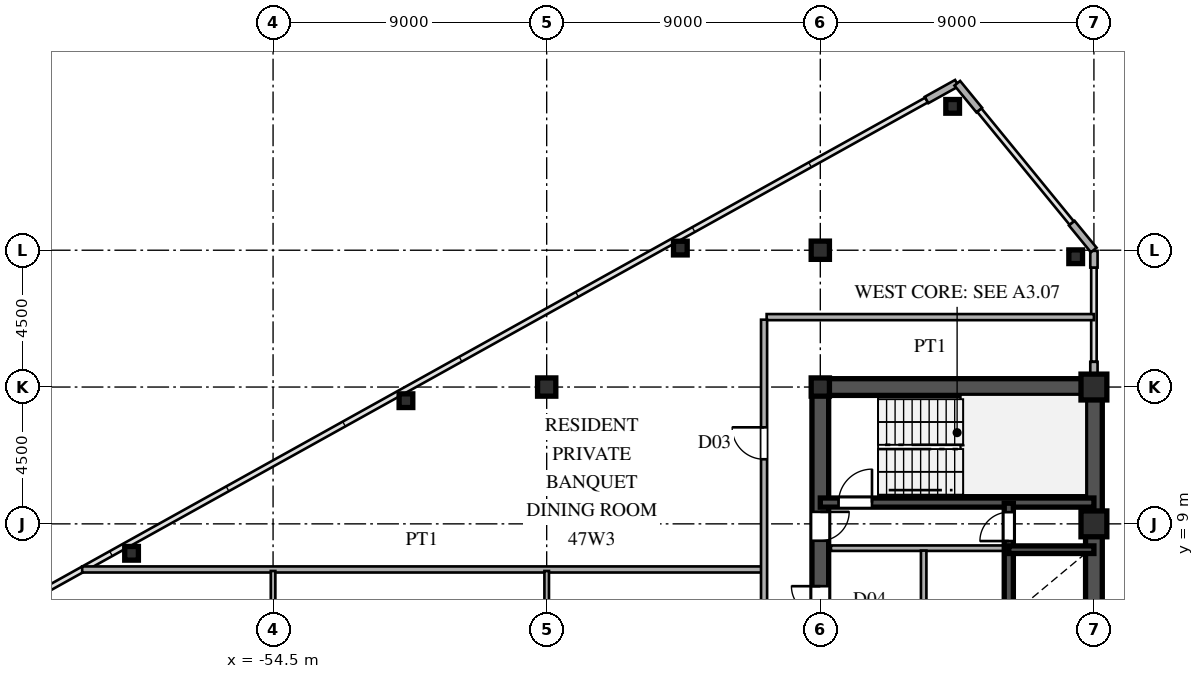
"""IFC4 building model, lengths in metres.
Left out: names, types, materials, properties, quantities, classifications, styles, units other than length and angle.
Written with IfcOpenShell. Run it as: python <this file> out.ifc"""

import sys

from ifc_helpers import new_model, si_unit, direction, frame, frame_2d, origin, origin_2d, place, context, subcontext, project, spatial, rectangle, hollow_rectangle, i_section, extrude, source, transform, mapped, element, fill, save


model = new_model("IFC4")
c1 = context("Model", 3, precision=1e-05, world=origin(), true_north=direction((0.0, 1.0)))
c2 = subcontext(c1, "Body", "Model", "MODEL_VIEW")
j1 = project(units=[si_unit("LENGTHUNIT", "METRE"), si_unit("PLANEANGLEUNIT", "RADIAN")], contexts=[c1])
p1 = place(None, origin())
s1 = spatial("IfcSite", under=j1, at=p1, CompositionType="ELEMENT")
p2 = place(p1, origin())
s2 = spatial("IfcBuilding", under=s1, at=p2, CompositionType="ELEMENT")
p3 = place(p2, frame((0.0, 0.0, 177.9)))
s3 = spatial("IfcBuildingStorey", under=s2, at=p3, CompositionType="ELEMENT", Elevation=177.9)
m1 = source(origin(), c2, "Body", "SweptSolid", [
    extrude(hollow_rectangle(XDim=0.85, YDim=0.85, WallThickness=0.036, at=origin_2d()), origin(), (0.0, 0.0, 1.0), 3.6),
])
for number, where, z_axis, x_axis in (
    (1, (-27.5, 9.0, 0.0), (0.0, 0.0, 1.0), (1.0, 0.0, 0.0)),
    (2, (-27.5, 13.5, 0.0), (0.0, 0.0, 1.0), (1.0, 0.0, 0.0)),
):
    element("IfcColumn", number, at=place(p3, frame(where, z_axis=z_axis, x_axis=x_axis)), inside=s3, PredefinedType="COLUMN", context=c2, shape_type="MappedRepresentation", body=[
        mapped(m1, transform((0.0, 0.0, 0.0), scale=1.0)),
    ])
m2 = source(origin(), c2, "Body", "SweptSolid", [
    extrude(i_section(OverallWidth=0.6, OverallDepth=0.6, WebThickness=0.025, FlangeThickness=0.04, at=origin_2d()), origin(), (0.0, 0.0, 1.0), 3.6),
])
for number, where, z_axis, x_axis in (
    (3, (-36.5, 13.5, 0.0), (0.0, 0.0, 1.0), (1.0, 0.0, 0.0)),
    (4, (-36.5, 18.0, 0.0), (0.0, 0.0, 1.0), (1.0, 0.0, 0.0)),
    (5, (-45.5, 13.5, 0.0), (0.0, 0.0, 1.0), (1.0, 0.0, 0.0)),
):
    element("IfcColumn", number, at=place(p3, frame(where, z_axis=z_axis, x_axis=x_axis)), inside=s3, PredefinedType="COLUMN", context=c2, shape_type="MappedRepresentation", body=[
        mapped(m2, transform((0.0, 0.0, 0.0), scale=1.0)),
    ])
m3 = source(origin(), c2, "Body", "SweptSolid", [
    extrude(hollow_rectangle(XDim=0.45, YDim=0.45, WallThickness=0.018, at=origin_2d()), origin(), (0.0, 0.0, 1.0), 3.6),
])
for number, where, z_axis, x_axis in (
    (6, (-28.1, 17.786, 0.0), (0.0, 0.0, 1.0), (1.0, 0.0, 0.0)),
    (7, (-32.147, 22.732, 0.0), (0.0, 0.0, 1.0), (1.0, 0.0, 0.0)),
    (8, (-41.104, 18.071, 0.0), (0.0, 0.0, 1.0), (1.0, 0.0, 0.0)),
    (9, (-50.129, 13.051, 0.0), (0.0, 0.0, 1.0), (1.0, 0.0, 0.0)),
    (10, (-59.155, 8.031, 0.0), (0.0, 0.0, 1.0), (1.0, 0.0, 0.0)),
):
    element("IfcColumn", number, at=place(p3, frame(where, z_axis=z_axis, x_axis=x_axis)), inside=s3, PredefinedType="COLUMN", context=c2, shape_type="MappedRepresentation", body=[
        mapped(m3, transform((0.0, 0.0, 0.0), scale=1.0)),
    ])
p4 = place(p3, frame((-27.5, 13.78, 0.0), z_axis=(0.0, 0.0, 1.0), x_axis=(0.0, 1.0, 0.0)))
e11 = element("IfcWall", 11, at=p4, inside=s3, PredefinedType="SOLIDWALL", context=c2, shape_type="SweptSolid", body=[
    extrude(rectangle(XDim=0.55, YDim=0.24, at=frame_2d((0.275, 0.0))), origin(), (0.0, 0.0, 1.0), 2.88),
])
p5 = place(p3, frame((-27.5, 17.43, 0.0), z_axis=(0.0, 0.0, 1.0), x_axis=(0.0, 1.0, 0.0)))
e12 = element("IfcWall", 12, at=p5, inside=s3, PredefinedType="SOLIDWALL", context=c2, shape_type="SweptSolid", body=[
    extrude(rectangle(XDim=0.55, YDim=0.24, at=frame_2d((0.275, 0.0))), origin(), (0.0, 0.0, 1.0), 3.38),
])
for number, where, z_axis, x_axis in (
    (13, (-27.506, 18.008, 0.0), (0.0, 0.0, 1.0), (-0.633, 0.774, 0.0)),
    (14, (-31.272, 22.61, 0.0), (0.0, 0.0, 1.0), (-0.633, 0.774, 0.0)),
):
    element("IfcWall", number, at=place(p3, frame(where, z_axis=z_axis, x_axis=x_axis)), inside=s3, PredefinedType="SOLIDWALL", context=c2, shape_type="SweptSolid", body=[
        extrude(rectangle(XDim=1.14, YDim=0.24, at=frame_2d((0.57, 0.0))), origin(), (0.0, 0.0, 1.0), 3.38),
    ])
p6 = place(p3, frame((-32.009, 23.495, 0.0), z_axis=(0.0, 0.0, 1.0), x_axis=(-0.87385402111, -0.486188389196, 0.0)))
e15 = element("IfcWall", 15, at=p6, inside=s3, PredefinedType="SOLIDWALL", context=c2, shape_type="SweptSolid", body=[
    extrude(rectangle(XDim=1.14, YDim=0.24, at=frame_2d((0.57, 0.0))), origin(), (0.0, 0.0, 1.0), 3.38),
])
p7 = place(p3, frame((-27.5, 1.3, 0.0), z_axis=(0.0, 0.0, 1.0), x_axis=(0.0, 1.0, 0.0)))
e16 = element("IfcWall", 16, at=p7, inside=s3, PredefinedType="SHEAR", context=c2, shape_type="SweptSolid", body=[
    extrude(rectangle(XDim=12.2, YDim=0.55, at=frame_2d((6.1, 0.0))), origin(), (0.0, 0.0, 1.0), 3.38),
])
p8 = place(p3, frame((-36.5, 13.5, 0.0), z_axis=(0.0, 0.0, 1.0), x_axis=(1.0, 0.0, 0.0)))
e17 = element("IfcWall", 17, at=p8, inside=s3, PredefinedType="SHEAR", context=c2, shape_type="SweptSolid", body=[
    extrude(rectangle(XDim=9.0, YDim=0.55, at=frame_2d((4.5, 0.0))), origin(), (0.0, 0.0, 1.0), 3.38),
])
p9 = place(p3, frame((-36.5, 8.2, 0.0), z_axis=(0.0, 0.0, 1.0), x_axis=(0.0, 1.0, 0.0)))
e18 = element("IfcWall", 18, at=p9, inside=s3, PredefinedType="SHEAR", context=c2, shape_type="SweptSolid", body=[
    extrude(rectangle(XDim=5.45, YDim=0.55, at=frame_2d((2.725, 0.0))), origin(), (0.0, 0.0, 1.0), 3.38),
])
p10 = place(p9, frame((0.245, 0.0, 0.0)))
e19 = element("IfcOpeningElement", 19, at=p10, cuts=e18, PredefinedType="OPENING", context=c2, shape_type="SweptSolid", body=[
    extrude(rectangle(XDim=0.95, YDim=2.15, at=frame_2d((0.475, 1.075))), frame((0.0, 0.285, 0.0), z_axis=(0.0, -1.0, 0.0), x_axis=(1.0, 0.0, 0.0)), (0.0, 0.0, 1.0), 0.57),
])
p11 = place(p3, frame((-36.5, 4.75, 0.0), z_axis=(0.0, 0.0, 1.0), x_axis=(0.0, 1.0, 0.0)))
e20 = element("IfcWall", 20, at=p11, inside=s3, PredefinedType="SHEAR", context=c2, shape_type="SweptSolid", body=[
    extrude(rectangle(XDim=3.45, YDim=0.55, at=frame_2d((1.725, 0.0))), origin(), (0.0, 0.0, 1.0), 3.38),
])
p12 = place(p11, frame((1.25, 0.0, 0.0)))
e21 = element("IfcOpeningElement", 21, at=p12, cuts=e20, PredefinedType="OPENING", context=c2, shape_type="SweptSolid", body=[
    extrude(rectangle(XDim=0.95, YDim=2.15, at=frame_2d((0.475, 1.075))), frame((0.0, 0.285, 0.0), z_axis=(0.0, -1.0, 0.0), x_axis=(1.0, 0.0, 0.0)), (0.0, 0.0, 1.0), 0.57),
])
p13 = place(p3, frame((-36.5, 9.7, 0.0), z_axis=(0.0, 0.0, 1.0), x_axis=(1.0, 0.0, 0.0)))
e22 = element("IfcWall", 22, at=p13, inside=s3, PredefinedType="SHEAR", context=c2, shape_type="SweptSolid", body=[
    extrude(rectangle(XDim=9.0, YDim=0.3, at=frame_2d((4.5, 0.0))), origin(), (0.0, 0.0, 1.0), 3.38),
])
p14 = place(p13, frame((0.6, 0.0, 0.0)))
e23 = element("IfcOpeningElement", 23, at=p14, cuts=e22, PredefinedType="OPENING", context=c2, shape_type="SweptSolid", body=[
    extrude(rectangle(XDim=1.1, YDim=2.2, at=frame_2d((0.55, 1.1))), frame((0.0, 0.16, 0.0), z_axis=(0.0, -1.0, 0.0), x_axis=(1.0, 0.0, 0.0)), (0.0, 0.0, 1.0), 0.32),
])
p15 = place(p3, frame((-30.3, 8.15, 0.0), z_axis=(0.0, 0.0, 1.0), x_axis=(1.0, 0.0, 0.0)))
e24 = element("IfcWall", 24, at=p15, inside=s3, PredefinedType="SHEAR", context=c2, shape_type="SweptSolid", body=[
    extrude(rectangle(XDim=2.8, YDim=0.25, at=frame_2d((1.4, 0.0))), origin(), (0.0, 0.0, 1.0), 3.38),
])
p16 = place(p3, frame((-30.3, 5.9, 0.0), z_axis=(0.0, 0.0, 1.0), x_axis=(0.0, 1.0, 0.0)))
e25 = element("IfcWall", 25, at=p16, inside=s3, PredefinedType="SHEAR", context=c2, shape_type="SweptSolid", body=[
    extrude(rectangle(XDim=2.25, YDim=0.3, at=frame_2d((1.125, 0.0))), origin(), (0.0, 0.0, 1.0), 3.38),
])
p17 = place(p3, frame((-30.3, 8.15, 0.0), z_axis=(0.0, 0.0, 1.0), x_axis=(0.0, 1.0, 0.0)))
e26 = element("IfcWall", 26, at=p17, inside=s3, PredefinedType="SHEAR", context=c2, shape_type="SweptSolid", body=[
    extrude(rectangle(XDim=1.53, YDim=0.3, at=frame_2d((0.765, 0.0))), origin(), (0.0, 0.0, 1.0), 3.38),
])
p18 = place(p17, frame((0.285, 0.0, 0.0)))
e27 = element("IfcOpeningElement", 27, at=p18, cuts=e26, PredefinedType="OPENING", context=c2, shape_type="SweptSolid", body=[
    extrude(rectangle(XDim=0.95, YDim=2.15, at=frame_2d((0.475, 1.075))), frame((0.0, 0.16, 0.0), z_axis=(0.0, -1.0, 0.0), x_axis=(1.0, 0.0, 0.0)), (0.0, 0.0, 1.0), 0.32),
])
p19 = place(p3, frame((-36.15, 8.2, 0.0), z_axis=(0.0, 0.0, 1.0), x_axis=(1.0, 0.0, 0.0)))
e28 = element("IfcWall", 28, at=p19, inside=s3, PredefinedType="PARTITIONING", context=c2, shape_type="SweptSolid", body=[
    extrude(rectangle(XDim=5.7, YDim=0.18, at=frame_2d((2.85, 0.0))), origin(), (0.0, 0.0, 1.0), 3.38),
])
p20 = place(p3, frame((-33.1, 1.38, 0.0), z_axis=(0.0, 0.0, 1.0), x_axis=(0.0, 1.0, 0.0)))
e29 = element("IfcWall", 29, at=p20, inside=s3, PredefinedType="PARTITIONING", context=c2, shape_type="SweptSolid", body=[
    extrude(rectangle(XDim=6.74, YDim=0.18, at=frame_2d((3.37, 0.0))), origin(), (0.0, 0.0, 1.0), 3.38),
])
p21 = place(p3, frame((-60.779, 7.5, 0.0), z_axis=(0.0, 0.0, 1.0), x_axis=(1.0, 0.0, 0.0)))
e30 = element("IfcWall", 30, at=p21, inside=s3, PredefinedType="PARTITIONING", context=c2, shape_type="SweptSolid", body=[
    extrude(rectangle(XDim=22.349, YDim=0.2, at=frame_2d((11.175, 0.0))), origin(), (0.0, 0.0, 1.0), 3.38),
])
p22 = place(p3, frame((-38.265, 15.8, 0.0), z_axis=(0.0, 0.0, 1.0), x_axis=(1.0, 0.0, 0.0)))
e31 = element("IfcWall", 31, at=p22, inside=s3, PredefinedType="PARTITIONING", context=c2, shape_type="SweptSolid", body=[
    extrude(rectangle(XDim=10.765, YDim=0.2, at=frame_2d((5.382, 0.0))), origin(), (0.0, 0.0, 1.0), 3.38),
])
p23 = place(p3, frame((-54.5, -6.45, 0.0), z_axis=(0.0, 0.0, 1.0), x_axis=(0.0, 1.0, 0.0)))
e32 = element("IfcWall", 32, at=p23, inside=s3, PredefinedType="PARTITIONING", context=c2, shape_type="SweptSolid", body=[
    extrude(rectangle(XDim=13.9, YDim=0.15, at=frame_2d((6.95, 0.0))), origin(), (0.0, 0.0, 1.0), 2.78),
])
p24 = place(p23, frame((6.475, 0.0, 0.0)))
e33 = element("IfcOpeningElement", 33, at=p24, cuts=e32, PredefinedType="OPENING", context=c2, shape_type="SweptSolid", body=[
    extrude(rectangle(XDim=0.95, YDim=2.15, at=frame_2d((0.475, 1.075))), frame((0.0, 0.085, 0.0), z_axis=(0.0, -1.0, 0.0), x_axis=(1.0, 0.0, 0.0)), (0.0, 0.0, 1.0), 0.17),
])
p25 = place(p3, frame((-45.5, 3.352, 0.0), z_axis=(0.0, 0.0, 1.0), x_axis=(0.0, 1.0, 0.0)))
e34 = element("IfcWall", 34, at=p25, inside=s3, PredefinedType="PARTITIONING", context=c2, shape_type="SweptSolid", body=[
    extrude(rectangle(XDim=4.098, YDim=0.15, at=frame_2d((2.049, 0.0))), origin(), (0.0, 0.0, 1.0), 2.78),
])
p26 = place(p3, frame((-38.35, -15.715, 0.0), z_axis=(0.0, 0.0, 1.0), x_axis=(0.0, 1.0, 0.0)))
e35 = element("IfcWall", 35, at=p26, inside=s3, PredefinedType="PARTITIONING", context=c2, shape_type="SweptSolid", body=[
    extrude(rectangle(XDim=31.43, YDim=0.2, at=frame_2d((15.715, 0.0))), origin(), (0.0, 0.0, 1.0), 3.38),
])
p27 = place(p26, frame((7.292, 0.0, 0.0)))
e36 = element("IfcOpeningElement", 36, at=p27, cuts=e35, PredefinedType="OPENING", context=c2, shape_type="SweptSolid", body=[
    extrude(rectangle(XDim=1.05, YDim=2.25, at=frame_2d((0.525, 1.125))), frame((0.0, 0.11, 0.0), z_axis=(0.0, -1.0, 0.0), x_axis=(1.0, 0.0, 0.0)), (0.0, 0.0, 1.0), 0.22),
])
p28 = place(p26, frame((15.48, 0.0, 0.0)))
e37 = element("IfcOpeningElement", 37, at=p28, cuts=e35, PredefinedType="OPENING", context=c2, shape_type="SweptSolid", body=[
    extrude(rectangle(XDim=1.05, YDim=2.25, at=frame_2d((0.525, 1.125))), frame((0.0, 0.11, 0.0), z_axis=(0.0, -1.0, 0.0), x_axis=(1.0, 0.0, 0.0)), (0.0, 0.0, 1.0), 0.22),
])
p29 = place(p26, frame((26.84, 0.0, 0.0)))
e38 = element("IfcOpeningElement", 38, at=p29, cuts=e35, PredefinedType="OPENING", context=c2, shape_type="SweptSolid", body=[
    extrude(rectangle(XDim=1.05, YDim=2.25, at=frame_2d((0.525, 1.125))), frame((0.0, 0.11, 0.0), z_axis=(0.0, -1.0, 0.0), x_axis=(1.0, 0.0, 0.0)), (0.0, 0.0, 1.0), 0.22),
])
m4 = source(origin(), c2, "Body", "SweptSolid", [
    extrude(rectangle(XDim=0.95, YDim=2.15, at=frame_2d((0.475, 1.075))), frame((0.0, 0.025, 0.0), z_axis=(0.0, -1.0, 0.0), x_axis=(1.0, 0.0, 0.0)), (0.0, 0.0, 1.0), 0.05),
])
p30 = place(p10, frame((0.95, 0.0, 0.0), z_axis=(0.0, 0.0, 1.0), x_axis=(-1.0, 0.0, 0.0)))
e39 = element("IfcDoor", 39, at=p30, inside=s3, OperationType="SINGLE_SWING_RIGHT", PredefinedType="DOOR", context=c2, shape_type="MappedRepresentation", body=[
    mapped(m4, transform((0.0, 0.0, 0.0), scale=1.0)),
])
fill(e19, e39)
p31 = place(p12, origin())
e40 = element("IfcDoor", 40, at=p31, inside=s3, OperationType="SINGLE_SWING_RIGHT", PredefinedType="DOOR", context=c2, shape_type="MappedRepresentation", body=[
    mapped(m4, transform((0.0, 0.0, 0.0), scale=1.0)),
])
fill(e21, e40)
m5 = source(origin(), c2, "Body", "SweptSolid", [
    extrude(rectangle(XDim=1.1, YDim=2.2, at=frame_2d((0.55, 1.1))), frame((0.0, 0.025, 0.0), z_axis=(0.0, -1.0, 0.0), x_axis=(1.0, 0.0, 0.0)), (0.0, 0.0, 1.0), 0.05),
])
p32 = place(p14, origin())
e41 = element("IfcDoor", 41, at=p32, inside=s3, OperationType="SINGLE_SWING_RIGHT", PredefinedType="DOOR", context=c2, shape_type="MappedRepresentation", body=[
    mapped(m5, transform((0.0, 0.0, 0.0), scale=1.0)),
])
fill(e23, e41)
p33 = place(p18, origin())
e42 = element("IfcDoor", 42, at=p33, inside=s3, OperationType="SINGLE_SWING_LEFT", PredefinedType="DOOR", context=c2, shape_type="MappedRepresentation", body=[
    mapped(m4, transform((0.0, 0.0, 0.0), scale=1.0)),
])
fill(e27, e42)
m6 = source(origin(), c2, "Body", "SweptSolid", [
    extrude(rectangle(XDim=1.05, YDim=2.25, at=frame_2d((0.525, 1.125))), frame((0.0, 0.025, 0.0), z_axis=(0.0, -1.0, 0.0), x_axis=(1.0, 0.0, 0.0)), (0.0, 0.0, 1.0), 0.05),
])
p34 = place(p29, origin())
e43 = element("IfcDoor", 43, at=p34, inside=s3, OperationType="SINGLE_SWING_RIGHT", PredefinedType="DOOR", context=c2, shape_type="MappedRepresentation", body=[
    mapped(m6, transform((0.0, 0.0, 0.0), scale=1.0)),
])
fill(e38, e43)
save(model, sys.argv[1])
